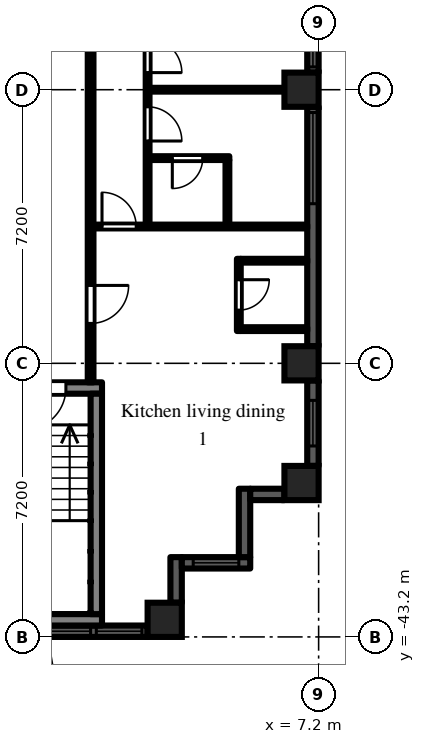
"""IFC4 building model, lengths in metres.
Left out: names, types, materials, properties, quantities, classifications, styles, units other than length and angle.
Written with IfcOpenShell. Run it as: python <this file> out.ifc"""

import sys

from ifc_helpers import new_model, si_unit, direction, frame, frame_2d, origin, origin_2d, place, context, subcontext, project, spatial, rectangle, extrude, element, fill, save


model = new_model("IFC4")
c1 = context("Model", 3, precision=1e-05, world=origin(), true_north=direction((0.0, 1.0)))
c2 = subcontext(c1, "Body", "Model", "MODEL_VIEW")
j1 = project(units=[si_unit("LENGTHUNIT", "METRE"), si_unit("PLANEANGLEUNIT", "RADIAN")], contexts=[c1])
p1 = place(None, origin())
s1 = spatial("IfcSite", under=j1, at=p1, CompositionType="ELEMENT")
p2 = place(p1, origin())
s2 = spatial("IfcBuilding", under=s1, at=p2, CompositionType="ELEMENT")
p3 = place(p2, frame((0.0, 0.0, 93.9)))
s3 = spatial("IfcBuildingStorey", under=s2, at=p3, CompositionType="ELEMENT", Elevation=93.9)
for number, where, z_axis, x_axis in (
    (1, (3.15, -42.75, 0.0), (0.0, 0.0, 1.0), (1.0, 0.0, 0.0)),
    (2, (6.75, -39.15, 0.0), (0.0, 0.0, 1.0), (1.0, 0.0, 0.0)),
    (3, (6.75, -36.0, 0.0), (0.0, 0.0, 1.0), (1.0, 0.0, 0.0)),
    (4, (6.75, -28.8, 0.0), (0.0, 0.0, 1.0), (1.0, 0.0, 0.0)),
):
    element("IfcColumn", number, at=place(p3, frame(where, z_axis=z_axis, x_axis=x_axis)), inside=s3, PredefinedType="COLUMN", context=c2, shape_type="SweptSolid", body=[
        extrude(rectangle(XDim=0.9, YDim=0.9, at=origin_2d()), origin(), (0.0, 0.0, 1.0), 3.0),
    ])
p4 = place(p3, frame((-2.7, -43.05, 0.0), z_axis=(0.0, 0.0, 1.0), x_axis=(1.0, 0.0, 0.0)))
e5 = element("IfcWall", 5, at=p4, inside=s3, PredefinedType="SOLIDWALL", context=c2, shape_type="SweptSolid", body=[
    extrude(rectangle(XDim=5.4, YDim=0.3, at=frame_2d((2.7, 0.0))), origin(), (0.0, 0.0, 1.0), 2.1),
])
p5 = place(p4, frame((1.5, 0.0, 0.2)))
e6 = element("IfcOpeningElement", 6, at=p5, cuts=e5, PredefinedType="OPENING", context=c2, shape_type="SweptSolid", body=[
    extrude(rectangle(XDim=2.4, YDim=1.85, at=frame_2d((1.2, 0.925))), frame((0.0, 0.16, 0.0), z_axis=(0.0, -1.0, 0.0), x_axis=(1.0, 0.0, 0.0)), (0.0, 0.0, 1.0), 0.32),
])
p6 = place(p4, frame((0.15, 0.0, 0.2)))
e7 = element("IfcOpeningElement", 7, at=p6, cuts=e5, PredefinedType="OPENING", context=c2, shape_type="SweptSolid", body=[
    extrude(rectangle(XDim=1.2, YDim=1.85, at=frame_2d((0.6, 0.925))), frame((0.0, 0.16, 0.0), z_axis=(0.0, -1.0, 0.0), x_axis=(1.0, 0.0, 0.0)), (0.0, 0.0, 1.0), 0.32),
])
p7 = place(p4, frame((4.05, 0.0, 0.2)))
e8 = element("IfcOpeningElement", 8, at=p7, cuts=e5, PredefinedType="OPENING", context=c2, shape_type="SweptSolid", body=[
    extrude(rectangle(XDim=1.2, YDim=1.85, at=frame_2d((0.6, 0.925))), frame((0.0, 0.16, 0.0), z_axis=(0.0, -1.0, 0.0), x_axis=(1.0, 0.0, 0.0)), (0.0, 0.0, 1.0), 0.32),
])
p8 = place(p3, frame((3.45, -42.3, 0.0), z_axis=(0.0, 0.0, 1.0), x_axis=(0.0, 1.0, 0.0)))
e9 = element("IfcWall", 9, at=p8, inside=s3, PredefinedType="SOLIDWALL", context=c2, shape_type="SweptSolid", body=[
    extrude(rectangle(XDim=1.2, YDim=0.3, at=frame_2d((0.6, 0.0))), origin(), (0.0, 0.0, 1.0), 2.575),
])
p9 = place(p3, frame((3.6, -41.25, 0.0), z_axis=(0.0, 0.0, 1.0), x_axis=(1.0, 0.0, 0.0)))
e10 = element("IfcWall", 10, at=p9, inside=s3, PredefinedType="SOLIDWALL", context=c2, shape_type="SweptSolid", body=[
    extrude(rectangle(XDim=1.8, YDim=0.3, at=frame_2d((0.9, 0.0))), origin(), (0.0, 0.0, 1.0), 2.575),
])
p10 = place(p9, frame((0.3, 0.0, 0.2)))
e11 = element("IfcOpeningElement", 11, at=p10, cuts=e10, PredefinedType="OPENING", context=c2, shape_type="SweptSolid", body=[
    extrude(rectangle(XDim=1.2, YDim=1.85, at=frame_2d((0.6, 0.925))), frame((0.0, 0.16, 0.0), z_axis=(0.0, -1.0, 0.0), x_axis=(1.0, 0.0, 0.0)), (0.0, 0.0, 1.0), 0.32),
])
p11 = place(p3, frame((5.25, -41.1, 0.0), z_axis=(0.0, 0.0, 1.0), x_axis=(0.0, 1.0, 0.0)))
e12 = element("IfcWall", 12, at=p11, inside=s3, PredefinedType="SOLIDWALL", context=c2, shape_type="SweptSolid", body=[
    extrude(rectangle(XDim=1.8, YDim=0.3, at=frame_2d((0.9, 0.0))), origin(), (0.0, 0.0, 1.0), 2.575),
])
p12 = place(p3, frame((5.4, -39.45, 0.0), z_axis=(0.0, 0.0, 1.0), x_axis=(1.0, 0.0, 0.0)))
e13 = element("IfcWall", 13, at=p12, inside=s3, PredefinedType="SOLIDWALL", context=c2, shape_type="SweptSolid", body=[
    extrude(rectangle(XDim=0.9, YDim=0.3, at=frame_2d((0.45, 0.0))), origin(), (0.0, 0.0, 1.0), 2.575),
])
p13 = place(p3, frame((7.05, -38.7, 0.0), z_axis=(0.0, 0.0, 1.0), x_axis=(0.0, 1.0, 0.0)))
e14 = element("IfcWall", 14, at=p13, inside=s3, PredefinedType="SOLIDWALL", context=c2, shape_type="SweptSolid", body=[
    extrude(rectangle(XDim=2.25, YDim=0.3, at=frame_2d((1.125, 0.0))), origin(), (0.0, 0.0, 1.0), 2.1),
])
p14 = place(p13, frame((0.525, 0.0, 0.2)))
e15 = element("IfcOpeningElement", 15, at=p14, cuts=e14, PredefinedType="OPENING", context=c2, shape_type="SweptSolid", body=[
    extrude(rectangle(XDim=1.2, YDim=1.85, at=frame_2d((0.6, 0.925))), frame((0.0, 0.16, 0.0), z_axis=(0.0, -1.0, 0.0), x_axis=(1.0, 0.0, 0.0)), (0.0, 0.0, 1.0), 0.32),
])
p15 = place(p3, frame((7.05, -35.55, 0.0), z_axis=(0.0, 0.0, 1.0), x_axis=(0.0, 1.0, 0.0)))
e16 = element("IfcWall", 16, at=p15, inside=s3, PredefinedType="SOLIDWALL", context=c2, shape_type="SweptSolid", body=[
    extrude(rectangle(XDim=6.3, YDim=0.3, at=frame_2d((3.15, 0.0))), origin(), (0.0, 0.0, 1.0), 2.1),
])
p16 = place(p15, frame((3.75, 0.0, 0.2)))
e17 = element("IfcOpeningElement", 17, at=p16, cuts=e16, PredefinedType="OPENING", context=c2, shape_type="SweptSolid", body=[
    extrude(rectangle(XDim=2.4, YDim=1.85, at=frame_2d((1.2, 0.925))), frame((0.0, 0.16, 0.0), z_axis=(0.0, -1.0, 0.0), x_axis=(1.0, 0.0, 0.0)), (0.0, 0.0, 1.0), 0.32),
])
p17 = place(p3, frame((7.05, -28.35, 0.0), z_axis=(0.0, 0.0, 1.0), x_axis=(0.0, 1.0, 0.0)))
e18 = element("IfcWall", 18, at=p17, inside=s3, PredefinedType="SOLIDWALL", context=c2, shape_type="SweptSolid", body=[
    extrude(rectangle(XDim=6.3, YDim=0.3, at=frame_2d((3.15, 0.0))), origin(), (0.0, 0.0, 1.0), 2.1),
])
p18 = place(p17, frame((0.15, 0.0, 0.2)))
e19 = element("IfcOpeningElement", 19, at=p18, cuts=e18, PredefinedType="OPENING", context=c2, shape_type="SweptSolid", body=[
    extrude(rectangle(XDim=2.4, YDim=1.85, at=frame_2d((1.2, 0.925))), frame((0.0, 0.16, 0.0), z_axis=(0.0, -1.0, 0.0), x_axis=(1.0, 0.0, 0.0)), (0.0, 0.0, 1.0), 0.32),
])
p19 = place(p17, frame((3.75, 0.0, 0.2)))
e20 = element("IfcOpeningElement", 20, at=p19, cuts=e18, PredefinedType="OPENING", context=c2, shape_type="SweptSolid", body=[
    extrude(rectangle(XDim=2.4, YDim=1.85, at=frame_2d((1.2, 0.925))), frame((0.0, 0.16, 0.0), z_axis=(0.0, -1.0, 0.0), x_axis=(1.0, 0.0, 0.0)), (0.0, 0.0, 1.0), 0.32),
])
p20 = place(p3, frame((-1.5, -36.65, 0.0), z_axis=(0.0, 0.0, 1.0), x_axis=(1.0, 0.0, 0.0)))
e21 = element("IfcWall", 21, at=p20, inside=s3, PredefinedType="SHEAR", context=c2, shape_type="SweptSolid", body=[
    extrude(rectangle(XDim=3.0, YDim=0.3, at=frame_2d((1.5, 0.0))), origin(), (0.0, 0.0, 1.0), 2.575),
])
p21 = place(p20, frame((0.95, 0.0, 0.0)))
e22 = element("IfcOpeningElement", 22, at=p21, cuts=e21, PredefinedType="OPENING", context=c2, shape_type="SweptSolid", body=[
    extrude(rectangle(XDim=1.1, YDim=2.1, at=frame_2d((0.55, 1.05))), frame((0.0, 0.16, 0.0), z_axis=(0.0, -1.0, 0.0), x_axis=(1.0, 0.0, 0.0)), (0.0, 0.0, 1.0), 0.32),
])
p22 = place(p3, frame((-1.5, -42.75, 0.0), z_axis=(0.0, 0.0, 1.0), x_axis=(1.0, 0.0, 0.0)))
e23 = element("IfcWall", 23, at=p22, inside=s3, PredefinedType="SHEAR", context=c2, shape_type="SweptSolid", body=[
    extrude(rectangle(XDim=3.0, YDim=0.3, at=frame_2d((1.5, 0.0))), origin(), (0.0, 0.0, 1.0), 2.575),
])
p23 = place(p3, frame((1.35, -36.8, 0.0), z_axis=(0.0, 0.0, 1.0), x_axis=(0.0, -1.0, 0.0)))
e24 = element("IfcWall", 24, at=p23, inside=s3, PredefinedType="SHEAR", context=c2, shape_type="SweptSolid", body=[
    extrude(rectangle(XDim=5.8, YDim=0.3, at=frame_2d((2.9, 0.0))), origin(), (0.0, 0.0, 1.0), 2.575),
])
p24 = place(p3, frame((1.2, -36.5, 0.0), z_axis=(0.0, 0.0, 1.0), x_axis=(0.0, 1.0, 0.0)))
e25 = element("IfcWall", 25, at=p24, inside=s3, PredefinedType="PARTITIONING", context=c2, shape_type="SweptSolid", body=[
    extrude(rectangle(XDim=35.375, YDim=0.15, at=frame_2d((17.688, 0.0))), origin(), (0.0, 0.0, 1.0), 2.575),
])
p25 = place(p24, frame((33.65, 0.0, 0.0)))
e26 = element("IfcOpeningElement", 26, at=p25, cuts=e25, PredefinedType="OPENING", context=c2, shape_type="SweptSolid", body=[
    extrude(rectangle(XDim=0.9, YDim=2.1, at=frame_2d((0.45, 1.05))), frame((0.0, 0.085, 0.0), z_axis=(0.0, -1.0, 0.0), x_axis=(1.0, 0.0, 0.0)), (0.0, 0.0, 1.0), 0.17),
])
p26 = place(p24, frame((30.65, 0.0, 0.0)))
e27 = element("IfcOpeningElement", 27, at=p26, cuts=e25, PredefinedType="OPENING", context=c2, shape_type="SweptSolid", body=[
    extrude(rectangle(XDim=0.9, YDim=2.1, at=frame_2d((0.45, 1.05))), frame((0.0, 0.085, 0.0), z_axis=(0.0, -1.0, 0.0), x_axis=(1.0, 0.0, 0.0)), (0.0, 0.0, 1.0), 0.17),
])
p27 = place(p24, frame((27.45, 0.0, 0.0)))
e28 = element("IfcOpeningElement", 28, at=p27, cuts=e25, PredefinedType="OPENING", context=c2, shape_type="SweptSolid", body=[
    extrude(rectangle(XDim=0.9, YDim=2.1, at=frame_2d((0.45, 1.05))), frame((0.0, 0.085, 0.0), z_axis=(0.0, -1.0, 0.0), x_axis=(1.0, 0.0, 0.0)), (0.0, 0.0, 1.0), 0.17),
])
p28 = place(p24, frame((23.85, 0.0, 0.0)))
e29 = element("IfcOpeningElement", 29, at=p28, cuts=e25, PredefinedType="OPENING", context=c2, shape_type="SweptSolid", body=[
    extrude(rectangle(XDim=0.9, YDim=2.1, at=frame_2d((0.45, 1.05))), frame((0.0, 0.085, 0.0), z_axis=(0.0, -1.0, 0.0), x_axis=(1.0, 0.0, 0.0)), (0.0, 0.0, 1.0), 0.17),
])
p29 = place(p24, frame((1.55, 0.0, 0.0)))
e30 = element("IfcOpeningElement", 30, at=p29, cuts=e25, PredefinedType="OPENING", context=c2, shape_type="SweptSolid", body=[
    extrude(rectangle(XDim=1.0, YDim=2.1, at=frame_2d((0.5, 1.05))), frame((0.0, 0.085, 0.0), z_axis=(0.0, -1.0, 0.0), x_axis=(1.0, 0.0, 0.0)), (0.0, 0.0, 1.0), 0.17),
])
p30 = place(p3, frame((1.275, -32.4, 0.0), z_axis=(0.0, 0.0, 1.0), x_axis=(1.0, 0.0, 0.0)))
e31 = element("IfcWall", 31, at=p30, inside=s3, PredefinedType="PARTITIONING", context=c2, shape_type="SweptSolid", body=[
    extrude(rectangle(XDim=5.625, YDim=0.1, at=frame_2d((2.812, 0.0))), origin(), (0.0, 0.0, 1.0), 2.575),
])
p31 = place(p30, frame((0.225, 0.0, 0.0)))
e32 = element("IfcOpeningElement", 32, at=p31, cuts=e31, PredefinedType="OPENING", context=c2, shape_type="SweptSolid", body=[
    extrude(rectangle(XDim=0.9, YDim=2.1, at=frame_2d((0.45, 1.05))), frame((0.0, 0.06, 0.0), z_axis=(0.0, -1.0, 0.0), x_axis=(1.0, 0.0, 0.0)), (0.0, 0.0, 1.0), 0.12),
])
p32 = place(p3, frame((2.7, -32.35, 0.0), z_axis=(0.0, 0.0, 1.0), x_axis=(0.0, 1.0, 0.0)))
e33 = element("IfcWall", 33, at=p32, inside=s3, PredefinedType="PARTITIONING", context=c2, shape_type="SweptSolid", body=[
    extrude(rectangle(XDim=17.888, YDim=0.1, at=frame_2d((8.944, 0.0))), origin(), (0.0, 0.0, 1.0), 2.575),
])
p33 = place(p32, frame((2.2, 0.0, 0.0)))
e34 = element("IfcOpeningElement", 34, at=p33, cuts=e33, PredefinedType="OPENING", context=c2, shape_type="SweptSolid", body=[
    extrude(rectangle(XDim=0.9, YDim=2.1, at=frame_2d((0.45, 1.05))), frame((0.0, 0.06, 0.0), z_axis=(0.0, -1.0, 0.0), x_axis=(1.0, 0.0, 0.0)), (0.0, 0.0, 1.0), 0.12),
])
p34 = place(p32, frame((4.0, 0.0, 0.0)))
e35 = element("IfcOpeningElement", 35, at=p34, cuts=e33, PredefinedType="OPENING", context=c2, shape_type="SweptSolid", body=[
    extrude(rectangle(XDim=0.9, YDim=2.1, at=frame_2d((0.45, 1.05))), frame((0.0, 0.06, 0.0), z_axis=(0.0, -1.0, 0.0), x_axis=(1.0, 0.0, 0.0)), (0.0, 0.0, 1.0), 0.12),
])
p35 = place(p32, frame((9.4, 0.0, 0.0)))
e36 = element("IfcOpeningElement", 36, at=p35, cuts=e33, PredefinedType="OPENING", context=c2, shape_type="SweptSolid", body=[
    extrude(rectangle(XDim=0.9, YDim=2.1, at=frame_2d((0.45, 1.05))), frame((0.0, 0.06, 0.0), z_axis=(0.0, -1.0, 0.0), x_axis=(1.0, 0.0, 0.0)), (0.0, 0.0, 1.0), 0.12),
])
p36 = place(p32, frame((11.2, 0.0, 0.0)))
e37 = element("IfcOpeningElement", 37, at=p36, cuts=e33, PredefinedType="OPENING", context=c2, shape_type="SweptSolid", body=[
    extrude(rectangle(XDim=0.9, YDim=2.1, at=frame_2d((0.45, 1.05))), frame((0.0, 0.06, 0.0), z_axis=(0.0, -1.0, 0.0), x_axis=(1.0, 0.0, 0.0)), (0.0, 0.0, 1.0), 0.12),
])
p37 = place(p32, frame((14.8, 0.0, 0.0)))
e38 = element("IfcOpeningElement", 38, at=p37, cuts=e33, PredefinedType="OPENING", context=c2, shape_type="SweptSolid", body=[
    extrude(rectangle(XDim=0.9, YDim=2.1, at=frame_2d((0.45, 1.05))), frame((0.0, 0.06, 0.0), z_axis=(0.0, -1.0, 0.0), x_axis=(1.0, 0.0, 0.0)), (0.0, 0.0, 1.0), 0.12),
])
p38 = place(p3, frame((2.75, -30.6, 0.0), z_axis=(0.0, 0.0, 1.0), x_axis=(1.0, 0.0, 0.0)))
e39 = element("IfcWall", 39, at=p38, inside=s3, PredefinedType="PARTITIONING", context=c2, shape_type="SweptSolid", body=[
    extrude(rectangle(XDim=2.1, YDim=0.1, at=frame_2d((1.05, 0.0))), origin(), (0.0, 0.0, 1.0), 2.575),
])
p39 = place(p38, frame((0.6, 0.0, 0.0)))
e40 = element("IfcOpeningElement", 40, at=p39, cuts=e39, PredefinedType="OPENING", context=c2, shape_type="SweptSolid", body=[
    extrude(rectangle(XDim=0.8, YDim=2.1, at=frame_2d((0.4, 1.05))), frame((0.0, 0.06, 0.0), z_axis=(0.0, -1.0, 0.0), x_axis=(1.0, 0.0, 0.0)), (0.0, 0.0, 1.0), 0.12),
])
p40 = place(p3, frame((2.75, -28.8, 0.0), z_axis=(0.0, 0.0, 1.0), x_axis=(1.0, 0.0, 0.0)))
e41 = element("IfcWall", 41, at=p40, inside=s3, PredefinedType="PARTITIONING", context=c2, shape_type="SweptSolid", body=[
    extrude(rectangle(XDim=4.15, YDim=0.1, at=frame_2d((2.075, 0.0))), origin(), (0.0, 0.0, 1.0), 2.575),
])
p41 = place(p3, frame((4.8, -32.35, 0.0), z_axis=(0.0, 0.0, 1.0), x_axis=(0.0, 1.0, 0.0)))
e42 = element("IfcWall", 42, at=p41, inside=s3, PredefinedType="PARTITIONING", context=c2, shape_type="SweptSolid", body=[
    extrude(rectangle(XDim=1.7, YDim=0.1, at=frame_2d((0.85, 0.0))), origin(), (0.0, 0.0, 1.0), 2.575),
])
p42 = place(p3, frame((5.1, -35.15, 0.0), z_axis=(0.0, 0.0, 1.0), x_axis=(0.0, 1.0, 0.0)))
e43 = element("IfcWall", 43, at=p42, inside=s3, PredefinedType="PARTITIONING", context=c2, shape_type="SweptSolid", body=[
    extrude(rectangle(XDim=1.9, YDim=0.1, at=frame_2d((0.95, 0.0))), origin(), (0.0, 0.0, 1.0), 2.575),
])
p43 = place(p42, frame((0.55, 0.0, 0.0)))
e44 = element("IfcOpeningElement", 44, at=p43, cuts=e43, PredefinedType="OPENING", context=c2, shape_type="SweptSolid", body=[
    extrude(rectangle(XDim=0.8, YDim=2.1, at=frame_2d((0.4, 1.05))), frame((0.0, 0.06, 0.0), z_axis=(0.0, -1.0, 0.0), x_axis=(1.0, 0.0, 0.0)), (0.0, 0.0, 1.0), 0.12),
])
for number, where, z_axis, x_axis in (
    (45, (5.15, -35.1, 0.0), (0.0, 0.0, 1.0), (1.0, 0.0, 0.0)),
    (46, (5.15, -33.3, 0.0), (0.0, 0.0, 1.0), (1.0, 0.0, 0.0)),
):
    element("IfcWall", number, at=place(p3, frame(where, z_axis=z_axis, x_axis=x_axis)), inside=s3, PredefinedType="PARTITIONING", context=c2, shape_type="SweptSolid", body=[
        extrude(rectangle(XDim=1.75, YDim=0.1, at=frame_2d((0.875, 0.0))), origin(), (0.0, 0.0, 1.0), 2.575),
    ])
p44 = place(p5, origin())
e47 = element("IfcWindow", 47, at=p44, inside=s3, PartitioningType="SINGLE_PANEL", PredefinedType="WINDOW", context=c2, shape_type="SweptSolid", body=[
    extrude(rectangle(XDim=2.4, YDim=1.85, at=frame_2d((1.2, 0.925))), frame((0.0, 0.03, 0.0), z_axis=(0.0, -1.0, 0.0), x_axis=(1.0, 0.0, 0.0)), (0.0, 0.0, 1.0), 0.06),
])
fill(e6, e47)
p45 = place(p7, origin())
e48 = element("IfcWindow", 48, at=p45, inside=s3, PartitioningType="SINGLE_PANEL", PredefinedType="WINDOW", context=c2, shape_type="SweptSolid", body=[
    extrude(rectangle(XDim=1.2, YDim=1.85, at=frame_2d((0.6, 0.925))), frame((0.0, 0.03, 0.0), z_axis=(0.0, -1.0, 0.0), x_axis=(1.0, 0.0, 0.0)), (0.0, 0.0, 1.0), 0.06),
])
fill(e8, e48)
p46 = place(p10, origin())
e49 = element("IfcWindow", 49, at=p46, inside=s3, PartitioningType="SINGLE_PANEL", PredefinedType="WINDOW", context=c2, shape_type="SweptSolid", body=[
    extrude(rectangle(XDim=1.2, YDim=1.85, at=frame_2d((0.6, 0.925))), frame((0.0, 0.03, 0.0), z_axis=(0.0, -1.0, 0.0), x_axis=(1.0, 0.0, 0.0)), (0.0, 0.0, 1.0), 0.06),
])
fill(e11, e49)
p47 = place(p14, origin())
e50 = element("IfcWindow", 50, at=p47, inside=s3, PartitioningType="SINGLE_PANEL", PredefinedType="WINDOW", context=c2, shape_type="SweptSolid", body=[
    extrude(rectangle(XDim=1.2, YDim=1.85, at=frame_2d((0.6, 0.925))), frame((0.0, 0.03, 0.0), z_axis=(0.0, -1.0, 0.0), x_axis=(1.0, 0.0, 0.0)), (0.0, 0.0, 1.0), 0.06),
])
fill(e15, e50)
p48 = place(p16, origin())
e51 = element("IfcWindow", 51, at=p48, inside=s3, PartitioningType="SINGLE_PANEL", PredefinedType="WINDOW", context=c2, shape_type="SweptSolid", body=[
    extrude(rectangle(XDim=2.4, YDim=1.85, at=frame_2d((1.2, 0.925))), frame((0.0, 0.03, 0.0), z_axis=(0.0, -1.0, 0.0), x_axis=(1.0, 0.0, 0.0)), (0.0, 0.0, 1.0), 0.06),
])
fill(e17, e51)
p49 = place(p18, origin())
e52 = element("IfcWindow", 52, at=p49, inside=s3, PartitioningType="SINGLE_PANEL", PredefinedType="WINDOW", context=c2, shape_type="SweptSolid", body=[
    extrude(rectangle(XDim=2.4, YDim=1.85, at=frame_2d((1.2, 0.925))), frame((0.0, 0.03, 0.0), z_axis=(0.0, -1.0, 0.0), x_axis=(1.0, 0.0, 0.0)), (0.0, 0.0, 1.0), 0.06),
])
fill(e19, e52)
p50 = place(p21, frame((1.1, 0.0, 0.0), z_axis=(0.0, 0.0, 1.0), x_axis=(-1.0, 0.0, 0.0)))
e53 = element("IfcDoor", 53, at=p50, inside=s3, OperationType="SINGLE_SWING_RIGHT", PredefinedType="DOOR", context=c2, shape_type="SweptSolid", body=[
    extrude(rectangle(XDim=1.1, YDim=2.1, at=frame_2d((0.55, 1.05))), frame((0.0, 0.025, 0.0), z_axis=(0.0, -1.0, 0.0), x_axis=(1.0, 0.0, 0.0)), (0.0, 0.0, 1.0), 0.05),
])
fill(e22, e53)
p51 = place(p43, frame((0.8, 0.0, 0.0), z_axis=(0.0, 0.0, 1.0), x_axis=(-1.0, 0.0, 0.0)))
e54 = element("IfcDoor", 54, at=p51, inside=s3, OperationType="SINGLE_SWING_LEFT", PredefinedType="DOOR", context=c2, shape_type="SweptSolid", body=[
    extrude(rectangle(XDim=0.8, YDim=2.1, at=frame_2d((0.4, 1.05))), frame((0.0, 0.025, 0.0), z_axis=(0.0, -1.0, 0.0), x_axis=(1.0, 0.0, 0.0)), (0.0, 0.0, 1.0), 0.05),
])
fill(e44, e54)
p52 = place(p29, frame((1.0, 0.0, 0.0), z_axis=(0.0, 0.0, 1.0), x_axis=(-1.0, 0.0, 0.0)))
e55 = element("IfcDoor", 55, at=p52, inside=s3, OperationType="SINGLE_SWING_LEFT", PredefinedType="DOOR", context=c2, shape_type="SweptSolid", body=[
    extrude(rectangle(XDim=1.0, YDim=2.1, at=frame_2d((0.5, 1.05))), frame((0.0, 0.025, 0.0), z_axis=(0.0, -1.0, 0.0), x_axis=(1.0, 0.0, 0.0)), (0.0, 0.0, 1.0), 0.05),
])
fill(e30, e55)
p53 = place(p31, origin())
e56 = element("IfcDoor", 56, at=p53, inside=s3, OperationType="SINGLE_SWING_LEFT", PredefinedType="DOOR", context=c2, shape_type="SweptSolid", body=[
    extrude(rectangle(XDim=0.9, YDim=2.1, at=frame_2d((0.45, 1.05))), frame((0.0, 0.025, 0.0), z_axis=(0.0, -1.0, 0.0), x_axis=(1.0, 0.0, 0.0)), (0.0, 0.0, 1.0), 0.05),
])
fill(e32, e56)
p54 = place(p33, frame((0.9, 0.0, 0.0), z_axis=(0.0, 0.0, 1.0), x_axis=(-1.0, 0.0, 0.0)))
e57 = element("IfcDoor", 57, at=p54, inside=s3, OperationType="SINGLE_SWING_RIGHT", PredefinedType="DOOR", context=c2, shape_type="SweptSolid", body=[
    extrude(rectangle(XDim=0.9, YDim=2.1, at=frame_2d((0.45, 1.05))), frame((0.0, 0.025, 0.0), z_axis=(0.0, -1.0, 0.0), x_axis=(1.0, 0.0, 0.0)), (0.0, 0.0, 1.0), 0.05),
])
fill(e34, e57)
p55 = place(p34, frame((0.9, 0.0, 0.0), z_axis=(0.0, 0.0, 1.0), x_axis=(-1.0, 0.0, 0.0)))
e58 = element("IfcDoor", 58, at=p55, inside=s3, OperationType="SINGLE_SWING_RIGHT", PredefinedType="DOOR", context=c2, shape_type="SweptSolid", body=[
    extrude(rectangle(XDim=0.9, YDim=2.1, at=frame_2d((0.45, 1.05))), frame((0.0, 0.025, 0.0), z_axis=(0.0, -1.0, 0.0), x_axis=(1.0, 0.0, 0.0)), (0.0, 0.0, 1.0), 0.05),
])
fill(e35, e58)
p56 = place(p39, frame((0.8, 0.0, 0.0), z_axis=(0.0, 0.0, 1.0), x_axis=(-1.0, 0.0, 0.0)))
e59 = element("IfcDoor", 59, at=p56, inside=s3, OperationType="SINGLE_SWING_RIGHT", PredefinedType="DOOR", context=c2, shape_type="SweptSolid", body=[
    extrude(rectangle(XDim=0.8, YDim=2.1, at=frame_2d((0.4, 1.05))), frame((0.0, 0.025, 0.0), z_axis=(0.0, -1.0, 0.0), x_axis=(1.0, 0.0, 0.0)), (0.0, 0.0, 1.0), 0.05),
])
fill(e40, e59)
save(model, sys.argv[1])
